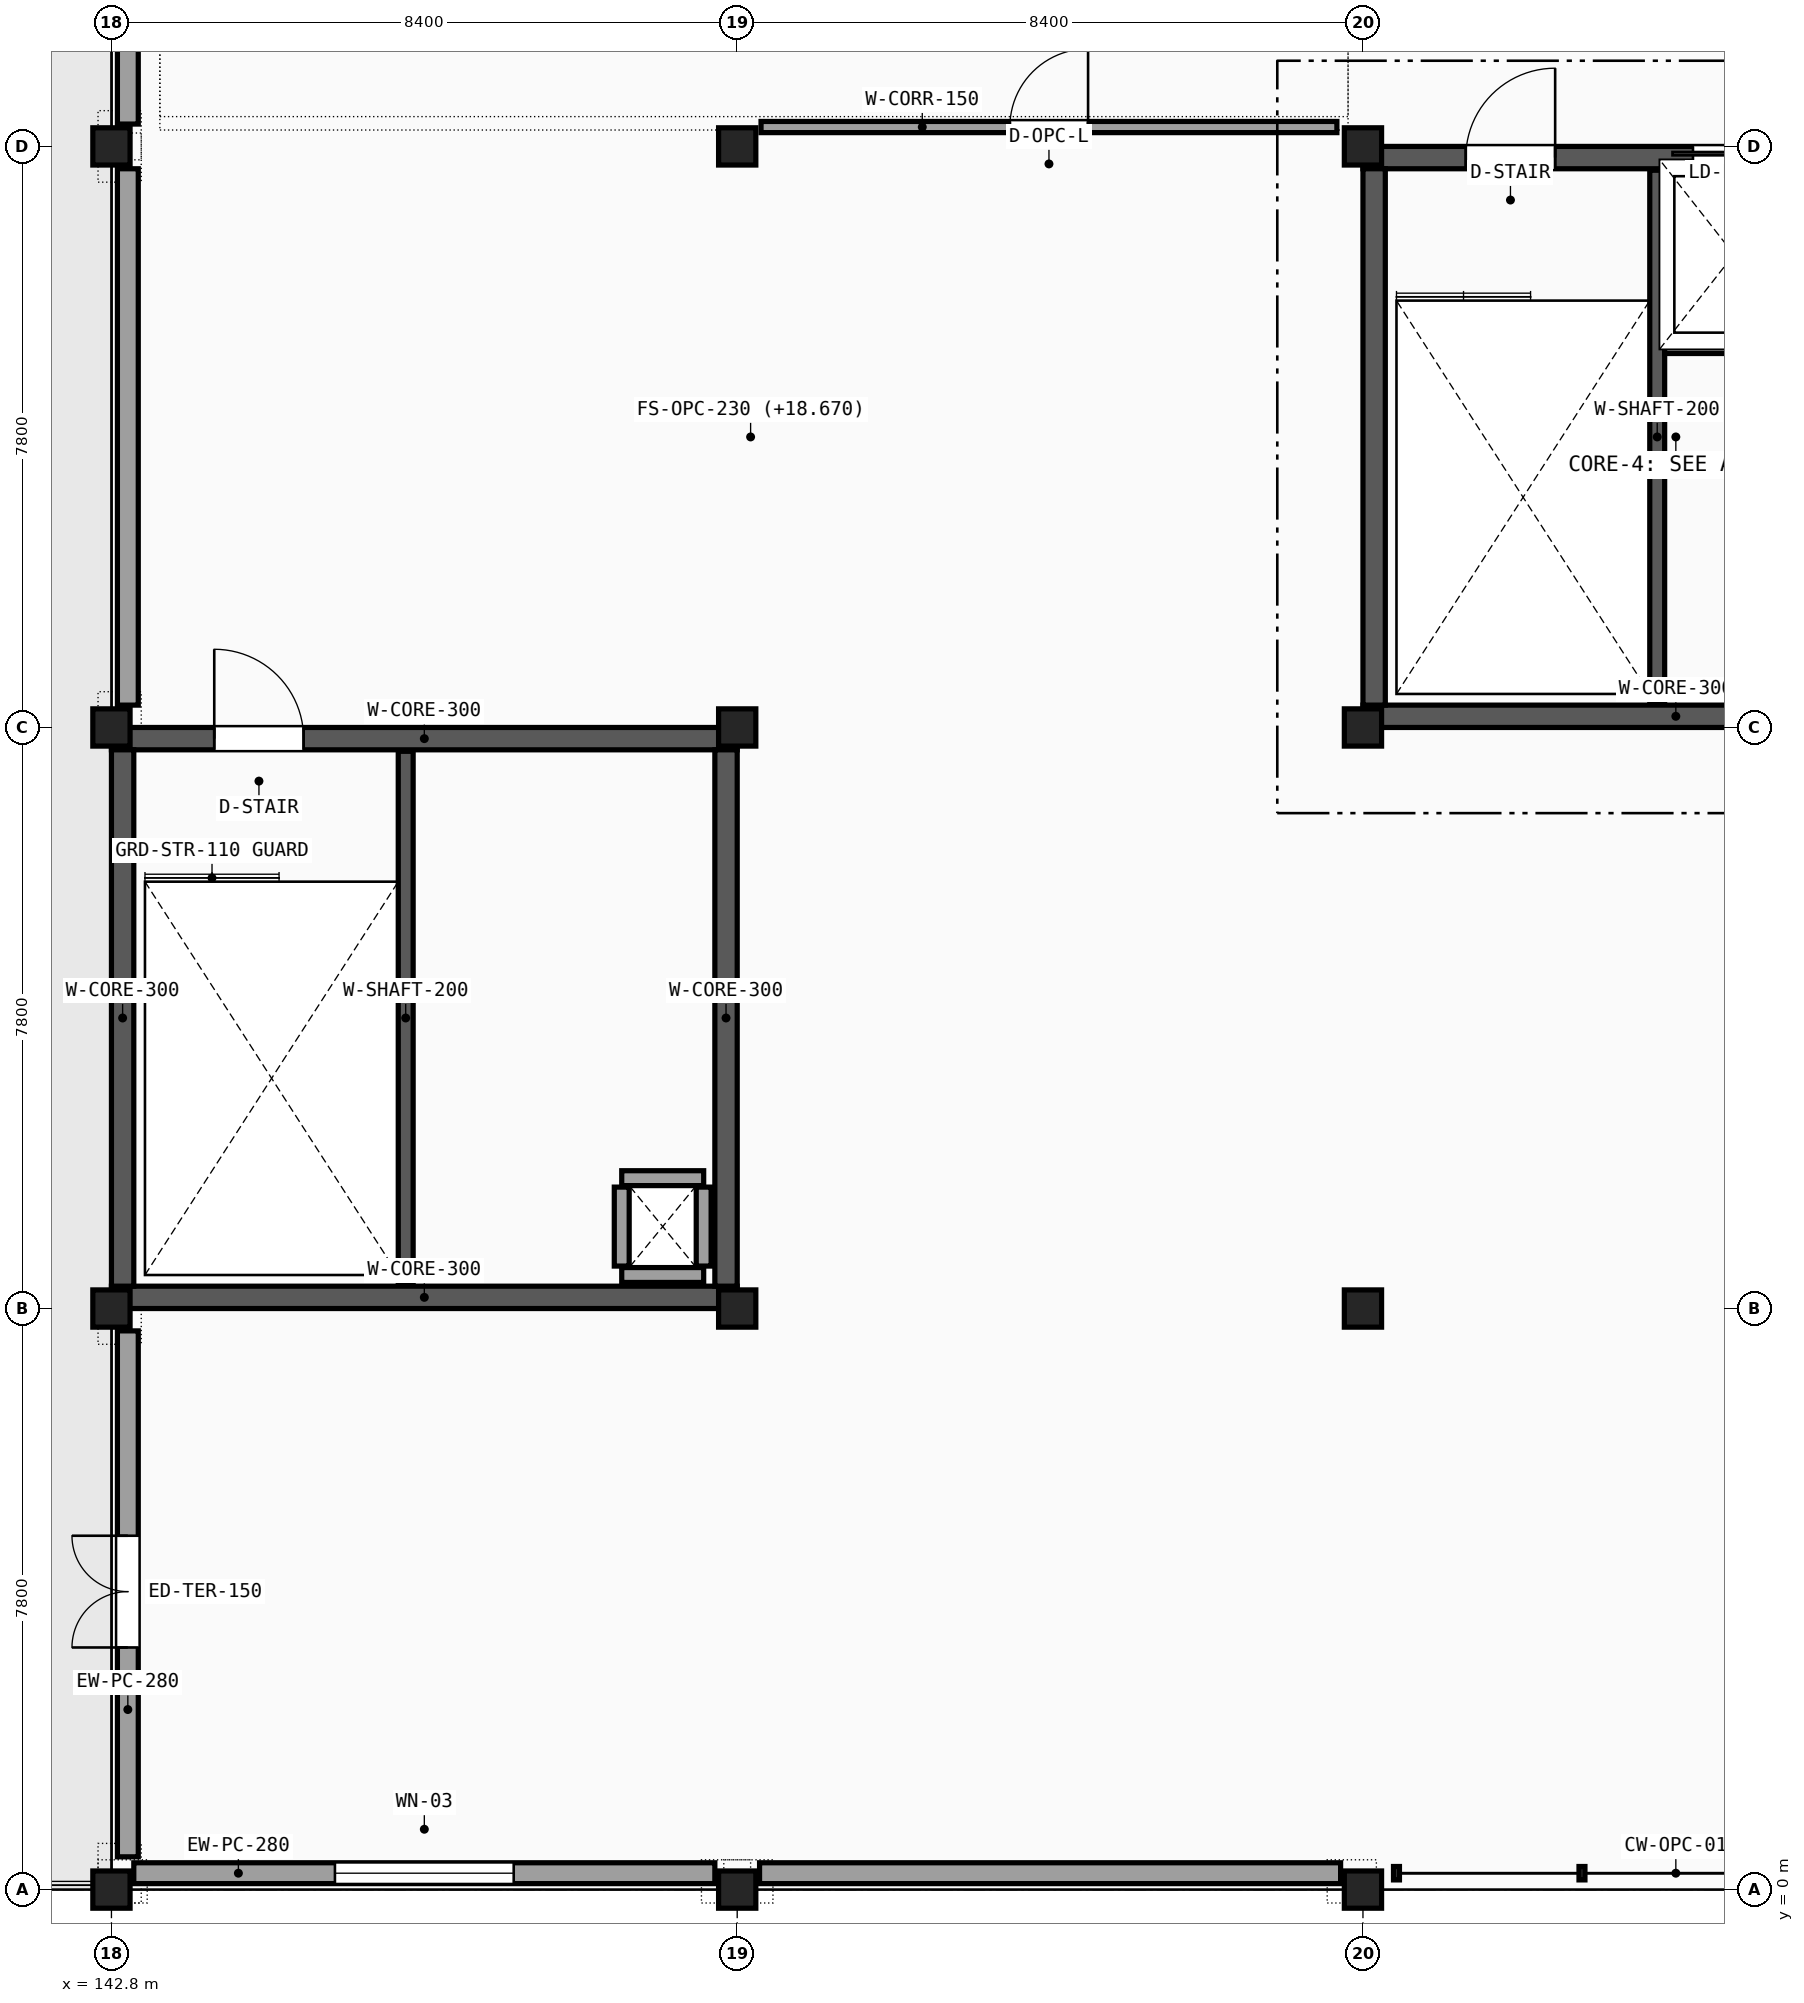
"""IFC4 building model, lengths in metres.
Left out: names, types, materials, properties, quantities, classifications, styles, units other than length and angle.
Written with IfcOpenShell. Run it as: python <this file> out.ifc"""

import sys

from ifc_helpers import new_model, si_unit, direction, frame, frame_2d, origin, origin_2d, place, context, subcontext, project, spatial, rectangle, extrude, element, fill, save


model = new_model("IFC4")
c1 = context("Model", 3, precision=1e-05, world=origin(), true_north=direction((0.0, 1.0)))
c2 = subcontext(c1, "Body", "Model", "MODEL_VIEW")
j1 = project(units=[si_unit("LENGTHUNIT", "METRE"), si_unit("PLANEANGLEUNIT", "RADIAN")], contexts=[c1])
p1 = place(None, origin())
s1 = spatial("IfcSite", under=j1, at=p1, CompositionType="ELEMENT")
p2 = place(p1, origin())
s2 = spatial("IfcBuilding", under=s1, at=p2, CompositionType="ELEMENT")
p3 = place(p2, frame((0.0, 0.0, 18.9)))
s3 = spatial("IfcBuildingStorey", under=s2, at=p3, CompositionType="ELEMENT", Elevation=18.9)
for number, where, z_axis, x_axis in (
    (1, (142.8, 0.0, 0.0), (0.0, 0.0, 1.0), (1.0, 0.0, 0.0)),
    (2, (142.8, 7.8, 0.0), (0.0, 0.0, 1.0), (1.0, 0.0, 0.0)),
    (3, (142.8, 15.6, 0.0), (0.0, 0.0, 1.0), (1.0, 0.0, 0.0)),
    (4, (142.8, 23.4, 0.0), (0.0, 0.0, 1.0), (1.0, 0.0, 0.0)),
    (5, (151.2, 0.0, 0.0), (0.0, 0.0, 1.0), (1.0, 0.0, 0.0)),
    (6, (151.2, 7.8, 0.0), (0.0, 0.0, 1.0), (1.0, 0.0, 0.0)),
    (7, (151.2, 15.6, 0.0), (0.0, 0.0, 1.0), (1.0, 0.0, 0.0)),
    (8, (151.2, 23.4, 0.0), (0.0, 0.0, 1.0), (1.0, 0.0, 0.0)),
    (9, (159.6, 0.0, 0.0), (0.0, 0.0, 1.0), (1.0, 0.0, 0.0)),
    (10, (159.6, 7.8, 0.0), (0.0, 0.0, 1.0), (1.0, 0.0, 0.0)),
    (11, (159.6, 15.6, 0.0), (0.0, 0.0, 1.0), (1.0, 0.0, 0.0)),
    (12, (159.6, 23.4, 0.0), (0.0, 0.0, 1.0), (1.0, 0.0, 0.0)),
):
    element("IfcColumn", number, at=place(p3, frame(where, z_axis=z_axis, x_axis=x_axis)), inside=s3, PredefinedType="COLUMN", context=c2, shape_type="SweptSolid", body=[
        extrude(rectangle(XDim=0.5, YDim=0.5, at=origin_2d()), origin(), (0.0, 0.0, 1.0), 4.05),
    ])
p4 = place(p3, frame((143.02, 0.44, 0.0), z_axis=(0.0, 0.0, 1.0), x_axis=(0.0, 1.0, 0.0)))
e13 = element("IfcWall", 13, at=p4, inside=s3, PredefinedType="SOLIDWALL", context=c2, shape_type="SweptSolid", body=[
    extrude(rectangle(XDim=7.06, YDim=0.28, at=frame_2d((3.53, 0.0))), origin(), (0.0, 0.0, 1.0), 3.77),
])
p5 = place(p4, frame((2.81, 0.0, 0.0)))
e14 = element("IfcOpeningElement", 14, at=p5, cuts=e13, PredefinedType="OPENING", context=c2, shape_type="SweptSolid", body=[
    extrude(rectangle(XDim=1.5, YDim=2.2, at=frame_2d((0.75, 1.1))), frame((0.0, 0.15, 0.0), z_axis=(0.0, -1.0, 0.0), x_axis=(1.0, 0.0, 0.0)), (0.0, 0.0, 1.0), 0.3),
])
p6 = place(p3, frame((143.02, 15.9, 0.0), z_axis=(0.0, 0.0, 1.0), x_axis=(0.0, 1.0, 0.0)))
e15 = element("IfcWall", 15, at=p6, inside=s3, PredefinedType="SOLIDWALL", context=c2, shape_type="SweptSolid", body=[
    extrude(rectangle(XDim=7.2, YDim=0.28, at=frame_2d((3.6, 0.0))), origin(), (0.0, 0.0, 1.0), 3.77),
])
p7 = place(p3, frame((143.02, 23.7, 0.0), z_axis=(0.0, 0.0, 1.0), x_axis=(0.0, 1.0, 0.0)))
e16 = element("IfcWall", 16, at=p7, inside=s3, PredefinedType="SOLIDWALL", context=c2, shape_type="SweptSolid", body=[
    extrude(rectangle(XDim=7.2, YDim=0.28, at=frame_2d((3.6, 0.0))), origin(), (0.0, 0.0, 1.0), 3.77),
])
p8 = place(p3, frame((143.1, 0.22, 0.0), z_axis=(0.0, 0.0, 1.0), x_axis=(1.0, 0.0, 0.0)))
e17 = element("IfcWall", 17, at=p8, inside=s3, PredefinedType="SOLIDWALL", context=c2, shape_type="SweptSolid", body=[
    extrude(rectangle(XDim=7.8, YDim=0.28, at=frame_2d((3.9, 0.0))), origin(), (0.0, 0.0, 1.0), 3.44),
])
p9 = place(p8, frame((2.7, 0.0, 0.9)))
e18 = element("IfcOpeningElement", 18, at=p9, cuts=e17, PredefinedType="OPENING", context=c2, shape_type="SweptSolid", body=[
    extrude(rectangle(XDim=2.4, YDim=1.6, at=frame_2d((1.2, 0.8))), frame((0.0, 0.15, 0.0), z_axis=(0.0, -1.0, 0.0), x_axis=(1.0, 0.0, 0.0)), (0.0, 0.0, 1.0), 0.3),
])
p10 = place(p3, frame((151.5, 0.22, 0.0), z_axis=(0.0, 0.0, 1.0), x_axis=(1.0, 0.0, 0.0)))
e19 = element("IfcWall", 19, at=p10, inside=s3, PredefinedType="SOLIDWALL", context=c2, shape_type="SweptSolid", body=[
    extrude(rectangle(XDim=7.8, YDim=0.28, at=frame_2d((3.9, 0.0))), origin(), (0.0, 0.0, 1.0), 3.44),
])
p11 = place(p3, frame((159.6, 15.75, 0.0), z_axis=(0.0, 0.0, 1.0), x_axis=(1.0, 0.0, 0.0)))
e20 = element("IfcWall", 20, at=p11, inside=s3, PredefinedType="SHEAR", context=c2, shape_type="SweptSolid", body=[
    extrude(rectangle(XDim=8.4, YDim=0.3, at=frame_2d((4.2, 0.0))), origin(), (0.0, 0.0, 1.0), 3.8),
])
p12 = place(p3, frame((159.6, 23.25, 0.0), z_axis=(0.0, 0.0, 1.0), x_axis=(1.0, 0.0, 0.0)))
e21 = element("IfcWall", 21, at=p12, inside=s3, PredefinedType="SHEAR", context=c2, shape_type="SweptSolid", body=[
    extrude(rectangle(XDim=8.4, YDim=0.3, at=frame_2d((4.2, 0.0))), origin(), (0.0, 0.0, 1.0), 3.8),
])
p13 = place(p12, frame((1.38, 0.0, 0.0)))
e22 = element("IfcOpeningElement", 22, at=p13, cuts=e21, PredefinedType="OPENING", context=c2, shape_type="SweptSolid", body=[
    extrude(rectangle(XDim=1.2, YDim=2.15, at=frame_2d((0.6, 1.075))), frame((0.0, 0.16, 0.0), z_axis=(0.0, -1.0, 0.0), x_axis=(1.0, 0.0, 0.0)), (0.0, 0.0, 1.0), 0.32),
])
p14 = place(p12, frame((4.43, 0.0, 0.0)))
e23 = element("IfcOpeningElement", 23, at=p14, cuts=e21, PredefinedType="OPENING", context=c2, shape_type="SweptSolid", body=[
    extrude(rectangle(XDim=1.1, YDim=2.15, at=frame_2d((0.55, 1.075))), frame((0.0, 0.16, 0.0), z_axis=(0.0, -1.0, 0.0), x_axis=(1.0, 0.0, 0.0)), (0.0, 0.0, 1.0), 0.32),
])
p15 = place(p12, frame((6.45, 0.0, 0.0)))
e24 = element("IfcOpeningElement", 24, at=p15, cuts=e21, PredefinedType="OPENING", context=c2, shape_type="SweptSolid", body=[
    extrude(rectangle(XDim=1.1, YDim=2.15, at=frame_2d((0.55, 1.075))), frame((0.0, 0.16, 0.0), z_axis=(0.0, -1.0, 0.0), x_axis=(1.0, 0.0, 0.0)), (0.0, 0.0, 1.0), 0.32),
])
p16 = place(p3, frame((159.75, 15.9, 0.0), z_axis=(0.0, 0.0, 1.0), x_axis=(0.0, 1.0, 0.0)))
e25 = element("IfcWall", 25, at=p16, inside=s3, PredefinedType="SHEAR", context=c2, shape_type="SweptSolid", body=[
    extrude(rectangle(XDim=7.2, YDim=0.3, at=frame_2d((3.6, 0.0))), origin(), (0.0, 0.0, 1.0), 3.8),
])
p17 = place(p3, frame((163.55, 15.92, 0.0), z_axis=(0.0, 0.0, 1.0), x_axis=(0.0, 1.0, 0.0)))
e26 = element("IfcWall", 26, at=p17, inside=s3, PredefinedType="SHEAR", context=c2, shape_type="SweptSolid", body=[
    extrude(rectangle(XDim=7.16, YDim=0.2, at=frame_2d((3.58, 0.0))), origin(), (0.0, 0.0, 1.0), 3.8),
])
p18 = place(p3, frame((163.65, 20.72, 0.0), z_axis=(0.0, 0.0, 1.0), x_axis=(1.0, 0.0, 0.0)))
e27 = element("IfcWall", 27, at=p18, inside=s3, PredefinedType="PARTITIONING", context=c2, shape_type="SweptSolid", body=[
    extrude(rectangle(XDim=1.86, YDim=0.2, at=frame_2d((0.93, 0.0))), origin(), (0.0, 0.0, 1.0), 3.44),
])
p19 = place(p3, frame((142.8, 7.95, 0.0), z_axis=(0.0, 0.0, 1.0), x_axis=(1.0, 0.0, 0.0)))
e28 = element("IfcWall", 28, at=p19, inside=s3, PredefinedType="SHEAR", context=c2, shape_type="SweptSolid", body=[
    extrude(rectangle(XDim=8.4, YDim=0.3, at=frame_2d((4.2, 0.0))), origin(), (0.0, 0.0, 1.0), 3.8),
])
p20 = place(p3, frame((142.8, 15.45, 0.0), z_axis=(0.0, 0.0, 1.0), x_axis=(1.0, 0.0, 0.0)))
e29 = element("IfcWall", 29, at=p20, inside=s3, PredefinedType="SHEAR", context=c2, shape_type="SweptSolid", body=[
    extrude(rectangle(XDim=8.4, YDim=0.3, at=frame_2d((4.2, 0.0))), origin(), (0.0, 0.0, 1.0), 3.8),
])
p21 = place(p20, frame((1.38, 0.0, 0.0)))
e30 = element("IfcOpeningElement", 30, at=p21, cuts=e29, PredefinedType="OPENING", context=c2, shape_type="SweptSolid", body=[
    extrude(rectangle(XDim=1.2, YDim=2.15, at=frame_2d((0.6, 1.075))), frame((0.0, 0.16, 0.0), z_axis=(0.0, -1.0, 0.0), x_axis=(1.0, 0.0, 0.0)), (0.0, 0.0, 1.0), 0.32),
])
for number, where, z_axis, x_axis in (
    (31, (142.95, 8.1, 0.0), (0.0, 0.0, 1.0), (0.0, 1.0, 0.0)),
    (32, (151.05, 8.1, 0.0), (0.0, 0.0, 1.0), (0.0, 1.0, 0.0)),
):
    element("IfcWall", number, at=place(p3, frame(where, z_axis=z_axis, x_axis=x_axis)), inside=s3, PredefinedType="SHEAR", context=c2, shape_type="SweptSolid", body=[
        extrude(rectangle(XDim=7.2, YDim=0.3, at=frame_2d((3.6, 0.0))), origin(), (0.0, 0.0, 1.0), 3.8),
    ])
p22 = place(p3, frame((146.75, 8.12, 0.0), z_axis=(0.0, 0.0, 1.0), x_axis=(0.0, 1.0, 0.0)))
e33 = element("IfcWall", 33, at=p22, inside=s3, PredefinedType="SHEAR", context=c2, shape_type="SweptSolid", body=[
    extrude(rectangle(XDim=7.16, YDim=0.2, at=frame_2d((3.58, 0.0))), origin(), (0.0, 0.0, 1.0), 3.8),
])
for number, where, z_axis, x_axis in (
    (34, (149.65, 8.25, 0.0), (0.0, 0.0, 1.0), (1.0, 0.0, 0.0)),
    (35, (149.65, 9.55, 0.0), (0.0, 0.0, 1.0), (1.0, 0.0, 0.0)),
):
    element("IfcWall", number, at=place(p3, frame(where, z_axis=z_axis, x_axis=x_axis)), inside=s3, PredefinedType="PARTITIONING", context=c2, shape_type="SweptSolid", body=[
        extrude(rectangle(XDim=1.1, YDim=0.2, at=frame_2d((0.55, 0.0))), origin(), (0.0, 0.0, 1.0), 3.44),
    ])
for number, where, z_axis, x_axis in (
    (36, (149.65, 8.37, 0.0), (0.0, 0.0, 1.0), (0.0, 1.0, 0.0)),
    (37, (150.75, 8.37, 0.0), (0.0, 0.0, 1.0), (0.0, 1.0, 0.0)),
):
    element("IfcWall", number, at=place(p3, frame(where, z_axis=z_axis, x_axis=x_axis)), inside=s3, PredefinedType="PARTITIONING", context=c2, shape_type="SweptSolid", body=[
        extrude(rectangle(XDim=1.06, YDim=0.2, at=frame_2d((0.53, 0.0))), origin(), (0.0, 0.0, 1.0), 3.44),
    ])
p23 = place(p3, frame((151.52, 23.66, 0.0), z_axis=(0.0, 0.0, 1.0), x_axis=(1.0, 0.0, 0.0)))
e38 = element("IfcWall", 38, at=p23, inside=s3, PredefinedType="PARTITIONING", context=c2, shape_type="SweptSolid", body=[
    extrude(rectangle(XDim=7.73, YDim=0.15, at=frame_2d((3.865, 0.0))), origin(), (0.0, 0.0, 1.0), 3.44),
])
p24 = place(p23, frame((3.34, 0.0, 0.0)))
e39 = element("IfcOpeningElement", 39, at=p24, cuts=e38, PredefinedType="OPENING", context=c2, shape_type="SweptSolid", body=[
    extrude(rectangle(XDim=1.05, YDim=2.15, at=frame_2d((0.525, 1.075))), frame((0.0, 0.085, 0.0), z_axis=(0.0, -1.0, 0.0), x_axis=(1.0, 0.0, 0.0)), (0.0, 0.0, 1.0), 0.17),
])
p25 = place(p5, origin())
e40 = element("IfcDoor", 40, at=p25, inside=s3, OperationType="DOUBLE_DOOR_SINGLE_SWING", PredefinedType="DOOR", context=c2, shape_type="SweptSolid", body=[
    extrude(rectangle(XDim=1.5, YDim=2.2, at=frame_2d((0.75, 1.1))), frame((0.0, 0.025, 0.0), z_axis=(0.0, -1.0, 0.0), x_axis=(1.0, 0.0, 0.0)), (0.0, 0.0, 1.0), 0.05),
])
fill(e14, e40)
p26 = place(p9, origin())
e41 = element("IfcWindow", 41, at=p26, inside=s3, PartitioningType="SINGLE_PANEL", PredefinedType="WINDOW", context=c2, shape_type="SweptSolid", body=[
    extrude(rectangle(XDim=2.4, YDim=1.6, at=frame_2d((1.2, 0.8))), frame((0.0, 0.03, 0.0), z_axis=(0.0, -1.0, 0.0), x_axis=(1.0, 0.0, 0.0)), (0.0, 0.0, 1.0), 0.06),
])
fill(e18, e41)
p27 = place(p13, origin())
e42 = element("IfcDoor", 42, at=p27, inside=s3, OperationType="SINGLE_SWING_RIGHT", PredefinedType="DOOR", context=c2, shape_type="SweptSolid", body=[
    extrude(rectangle(XDim=1.2, YDim=2.15, at=frame_2d((0.6, 1.075))), frame((0.0, 0.025, 0.0), z_axis=(0.0, -1.0, 0.0), x_axis=(1.0, 0.0, 0.0)), (0.0, 0.0, 1.0), 0.05),
])
fill(e22, e42)
p28 = place(p14, origin())
e43 = element("IfcDoor", 43, at=p28, inside=s3, OperationType="DOUBLE_DOOR_SLIDING", PredefinedType="DOOR", context=c2, shape_type="SweptSolid", body=[
    extrude(rectangle(XDim=1.1, YDim=2.15, at=frame_2d((0.55, 1.075))), frame((0.0, 0.025, 0.0), z_axis=(0.0, -1.0, 0.0), x_axis=(1.0, 0.0, 0.0)), (0.0, 0.0, 1.0), 0.05),
])
fill(e23, e43)
p29 = place(p21, origin())
e44 = element("IfcDoor", 44, at=p29, inside=s3, OperationType="SINGLE_SWING_LEFT", PredefinedType="DOOR", context=c2, shape_type="SweptSolid", body=[
    extrude(rectangle(XDim=1.2, YDim=2.15, at=frame_2d((0.6, 1.075))), frame((0.0, 0.025, 0.0), z_axis=(0.0, -1.0, 0.0), x_axis=(1.0, 0.0, 0.0)), (0.0, 0.0, 1.0), 0.05),
])
fill(e30, e44)
p30 = place(p24, origin())
e45 = element("IfcDoor", 45, at=p30, inside=s3, OperationType="SINGLE_SWING_RIGHT", PredefinedType="DOOR", context=c2, shape_type="SweptSolid", body=[
    extrude(rectangle(XDim=1.05, YDim=2.15, at=frame_2d((0.525, 1.075))), frame((0.0, 0.025, 0.0), z_axis=(0.0, -1.0, 0.0), x_axis=(1.0, 0.0, 0.0)), (0.0, 0.0, 1.0), 0.05),
])
fill(e39, e45)
save(model, sys.argv[1])
